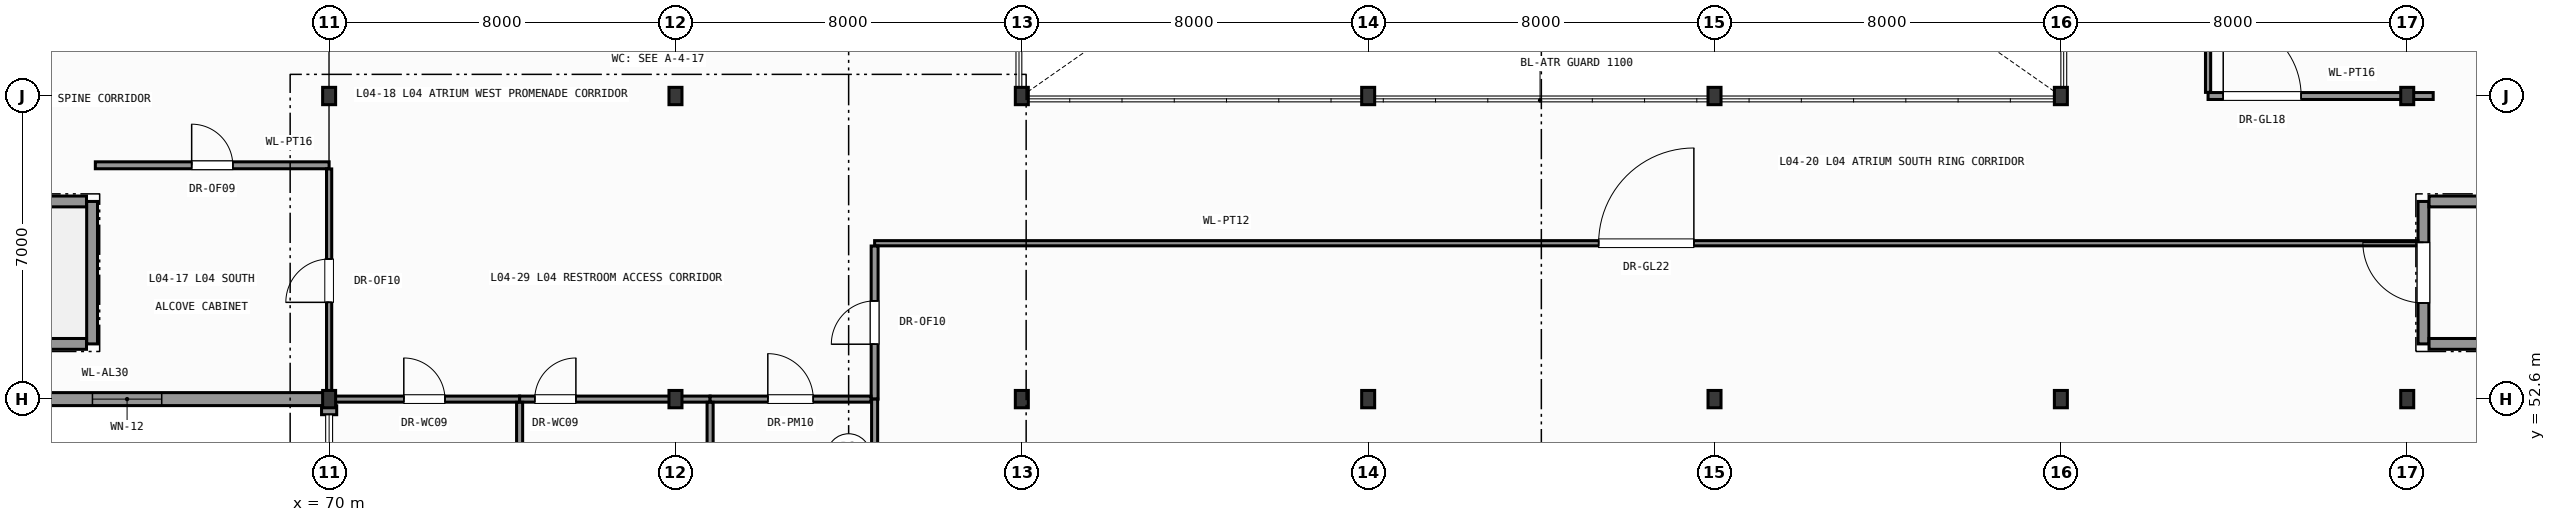
"""IFC4 building model, lengths in metres.
Left out: names, types, materials, properties, quantities, classifications, styles, units other than length and angle.
Written with IfcOpenShell. Run it as: python <this file> out.ifc"""

import sys

from ifc_helpers import new_model, si_unit, direction, frame, frame_2d, origin, origin_2d, place, context, subcontext, project, spatial, rectangle, i_section, extrude, element, fill, save


model = new_model("IFC4")
c1 = context("Model", 3, precision=1e-05, world=origin(), true_north=direction((0.0, 1.0)))
c2 = subcontext(c1, "Body", "Model", "MODEL_VIEW")
j1 = project(units=[si_unit("LENGTHUNIT", "METRE"), si_unit("PLANEANGLEUNIT", "RADIAN")], contexts=[c1])
p1 = place(None, origin())
s1 = spatial("IfcSite", under=j1, at=p1, CompositionType="ELEMENT")
p2 = place(p1, origin())
s2 = spatial("IfcBuilding", under=s1, at=p2, CompositionType="ELEMENT")
p3 = place(p2, frame((0.0, 0.0, 18.0)))
s3 = spatial("IfcBuildingStorey", under=s2, at=p3, CompositionType="ELEMENT", Elevation=18.0)
for number, where, z_axis, x_axis in (
    (1, (70.0, 52.6, 0.0), (0.0, 0.0, 1.0), (1.0, 0.0, 0.0)),
    (2, (70.0, 59.6, 0.0), (0.0, 0.0, 1.0), (1.0, 0.0, 0.0)),
    (3, (78.0, 52.6, 0.0), (0.0, 0.0, 1.0), (1.0, 0.0, 0.0)),
    (4, (78.0, 59.6, 0.0), (0.0, 0.0, 1.0), (1.0, 0.0, 0.0)),
    (5, (86.0, 52.6, 0.0), (0.0, 0.0, 1.0), (1.0, 0.0, 0.0)),
    (6, (86.0, 59.6, 0.0), (0.0, 0.0, 1.0), (1.0, 0.0, 0.0)),
    (7, (94.0, 52.6, 0.0), (0.0, 0.0, 1.0), (1.0, 0.0, 0.0)),
    (8, (94.0, 59.6, 0.0), (0.0, 0.0, 1.0), (1.0, 0.0, 0.0)),
    (9, (102.0, 52.6, 0.0), (0.0, 0.0, 1.0), (1.0, 0.0, 0.0)),
    (10, (102.0, 59.6, 0.0), (0.0, 0.0, 1.0), (1.0, 0.0, 0.0)),
    (11, (110.0, 52.6, 0.0), (0.0, 0.0, 1.0), (1.0, 0.0, 0.0)),
    (12, (110.0, 59.6, 0.0), (0.0, 0.0, 1.0), (1.0, 0.0, 0.0)),
    (13, (118.0, 52.6, 0.0), (0.0, 0.0, 1.0), (1.0, 0.0, 0.0)),
    (14, (118.0, 59.6, 0.0), (0.0, 0.0, 1.0), (1.0, 0.0, 0.0)),
):
    element("IfcColumn", number, at=place(p3, frame(where, z_axis=z_axis, x_axis=x_axis)), inside=s3, PredefinedType="COLUMN", context=c2, shape_type="SweptSolid", body=[
        extrude(i_section(OverallWidth=0.3, OverallDepth=0.4, WebThickness=0.013, FlangeThickness=0.024, FilletRadius=0.027, at=origin_2d()), origin(), (0.0, 0.0, 1.0), 4.2),
    ])
p4 = place(p3, frame((70.0, 52.6, 0.0), z_axis=(0.0, 0.0, 1.0), x_axis=(-1.0, 0.0, 0.0)))
e15 = element("IfcWall", 15, at=p4, inside=s3, PredefinedType="SOLIDWALL", context=c2, shape_type="SweptSolid", body=[
    extrude(rectangle(XDim=14.0, YDim=0.3, at=frame_2d((7.0, 0.0))), origin(), (0.0, 0.0, 1.0), 3.415),
])
p5 = place(p4, frame((3.867, 0.0, 0.95)))
e16 = element("IfcOpeningElement", 16, at=p5, cuts=e15, PredefinedType="OPENING", context=c2, shape_type="SweptSolid", body=[
    extrude(rectangle(XDim=1.6, YDim=2.06, at=frame_2d((0.8, 1.03))), frame((0.0, 0.16, 0.0), z_axis=(0.0, -1.0, 0.0), x_axis=(1.0, 0.0, 0.0)), (0.0, 0.0, 1.0), 0.32),
])
p6 = place(p4, frame((8.533, 0.0, 0.95)))
e17 = element("IfcOpeningElement", 17, at=p6, cuts=e15, PredefinedType="OPENING", context=c2, shape_type="SweptSolid", body=[
    extrude(rectangle(XDim=1.6, YDim=2.06, at=frame_2d((0.8, 1.03))), frame((0.0, 0.16, 0.0), z_axis=(0.0, -1.0, 0.0), x_axis=(1.0, 0.0, 0.0)), (0.0, 0.0, 1.0), 0.32),
])
p7 = place(p3, frame((70.0, 52.446, 0.0), z_axis=(0.0, 0.0, 1.0), x_axis=(0.0, -1.0, 0.0)))
e18 = element("IfcWall", 18, at=p7, inside=s3, PredefinedType="SOLIDWALL", context=c2, shape_type="SweptSolid", body=[
    extrude(rectangle(XDim=0.206, YDim=0.35, at=frame_2d((0.103, 0.0))), origin(), (0.0, 0.0, 1.0), 3.98),
])
p8 = place(p3, frame((64.525, 53.875, 0.0), z_axis=(0.0, 0.0, 1.0), x_axis=(0.0, 1.0, 0.0)))
e19 = element("IfcWall", 19, at=p8, inside=s3, PredefinedType="SHEAR", context=c2, shape_type="SweptSolid", body=[
    extrude(rectangle(XDim=3.29, YDim=0.25, at=frame_2d((1.645, 0.0))), origin(), (0.0, 0.0, 1.0), 3.98),
])
for number, where, z_axis, x_axis in (
    (20, (57.204, 53.875, 0.0), (0.0, 0.0, 1.0), (1.0, 0.0, 0.0)),
    (21, (57.204, 57.165, 0.0), (0.0, 0.0, 1.0), (1.0, 0.0, 0.0)),
):
    element("IfcWall", number, at=place(p3, frame(where, z_axis=z_axis, x_axis=x_axis)), inside=s3, PredefinedType="SHEAR", context=c2, shape_type="SweptSolid", body=[
        extrude(rectangle(XDim=7.192, YDim=0.25, at=frame_2d((3.596, 0.0))), origin(), (0.0, 0.0, 1.0), 3.98),
    ])
p9 = place(p3, frame((118.375, 53.875, 0.0), z_axis=(0.0, 0.0, 1.0), x_axis=(0.0, 1.0, 0.0)))
e22 = element("IfcWall", 22, at=p9, inside=s3, PredefinedType="SHEAR", context=c2, shape_type="SweptSolid", body=[
    extrude(rectangle(XDim=3.29, YDim=0.25, at=frame_2d((1.645, 0.0))), origin(), (0.0, 0.0, 1.0), 3.98),
])
p10 = place(p9, frame((0.945, 0.0, 0.0)))
e23 = element("IfcOpeningElement", 23, at=p10, cuts=e22, PredefinedType="OPENING", context=c2, shape_type="SweptSolid", body=[
    extrude(rectangle(XDim=1.4, YDim=2.2, at=frame_2d((0.7, 1.1))), frame((0.0, 0.135, 0.0), z_axis=(0.0, -1.0, 0.0), x_axis=(1.0, 0.0, 0.0)), (0.0, 0.0, 1.0), 0.27),
])
for number, where, z_axis, x_axis in (
    (24, (118.504, 53.875, 0.0), (0.0, 0.0, 1.0), (1.0, 0.0, 0.0)),
    (25, (118.504, 57.165, 0.0), (0.0, 0.0, 1.0), (1.0, 0.0, 0.0)),
):
    element("IfcWall", number, at=place(p3, frame(where, z_axis=z_axis, x_axis=x_axis)), inside=s3, PredefinedType="SHEAR", context=c2, shape_type="SweptSolid", body=[
        extrude(rectangle(XDim=6.892, YDim=0.25, at=frame_2d((3.446, 0.0))), origin(), (0.0, 0.0, 1.0), 3.98),
    ])
p11 = place(p3, frame((64.6, 58.0, 0.0), z_axis=(0.0, 0.0, 1.0), x_axis=(1.0, 0.0, 0.0)))
e26 = element("IfcWall", 26, at=p11, inside=s3, PredefinedType="PARTITIONING", context=c2, shape_type="SweptSolid", body=[
    extrude(rectangle(XDim=5.4, YDim=0.16, at=frame_2d((2.7, 0.0))), origin(), (0.0, 0.0, 1.0), 3.98),
])
p12 = place(p11, frame((2.225, 0.0, 0.0)))
e27 = element("IfcOpeningElement", 27, at=p12, cuts=e26, PredefinedType="OPENING", context=c2, shape_type="SweptSolid", body=[
    extrude(rectangle(XDim=0.95, YDim=2.1, at=frame_2d((0.475, 1.05))), frame((0.0, 0.09, 0.0), z_axis=(0.0, -1.0, 0.0), x_axis=(1.0, 0.0, 0.0)), (0.0, 0.0, 1.0), 0.18),
])
p13 = place(p3, frame((70.0, 52.754, 0.0), z_axis=(0.0, 0.0, 1.0), x_axis=(0.0, 1.0, 0.0)))
e28 = element("IfcWall", 28, at=p13, inside=s3, PredefinedType="PARTITIONING", context=c2, shape_type="SweptSolid", body=[
    extrude(rectangle(XDim=5.162, YDim=0.12, at=frame_2d((2.581, 0.0))), origin(), (0.0, 0.0, 1.0), 3.525),
])
p14 = place(p13, frame((2.081, 0.0, 0.0)))
e29 = element("IfcOpeningElement", 29, at=p14, cuts=e28, PredefinedType="OPENING", context=c2, shape_type="SweptSolid", body=[
    extrude(rectangle(XDim=1.0, YDim=2.15, at=frame_2d((0.5, 1.075))), frame((0.0, 0.07, 0.0), z_axis=(0.0, -1.0, 0.0), x_axis=(1.0, 0.0, 0.0)), (0.0, 0.0, 1.0), 0.14),
])
p15 = place(p3, frame((82.6, 56.2, 0.0), z_axis=(0.0, 0.0, 1.0), x_axis=(1.0, 0.0, 0.0)))
e30 = element("IfcWall", 30, at=p15, inside=s3, PredefinedType="PARTITIONING", context=c2, shape_type="SweptSolid", body=[
    extrude(rectangle(XDim=35.646, YDim=0.12, at=frame_2d((17.823, 0.0))), origin(), (0.0, 0.0, 1.0), 3.605),
])
p16 = place(p15, frame((16.723, 0.0, 0.0)))
e31 = element("IfcOpeningElement", 31, at=p16, cuts=e30, PredefinedType="OPENING", context=c2, shape_type="SweptSolid", body=[
    extrude(rectangle(XDim=2.2, YDim=2.6, at=frame_2d((1.1, 1.3))), frame((0.0, 0.07, 0.0), z_axis=(0.0, -1.0, 0.0), x_axis=(1.0, 0.0, 0.0)), (0.0, 0.0, 1.0), 0.14),
])
p17 = place(p3, frame((113.4, 59.6, 0.0), z_axis=(0.0, 0.0, 1.0), x_axis=(1.0, 0.0, 0.0)))
e32 = element("IfcWall", 32, at=p17, inside=s3, PredefinedType="PARTITIONING", context=c2, shape_type="SweptSolid", body=[
    extrude(rectangle(XDim=5.2, YDim=0.16, at=frame_2d((2.6, 0.0))), origin(), (0.0, 0.0, 1.0), 3.575),
])
p18 = place(p17, frame((0.35, 0.0, 0.0)))
e33 = element("IfcOpeningElement", 33, at=p18, cuts=e32, PredefinedType="OPENING", context=c2, shape_type="SweptSolid", body=[
    extrude(rectangle(XDim=1.8, YDim=2.4, at=frame_2d((0.9, 1.2))), frame((0.0, 0.09, 0.0), z_axis=(0.0, -1.0, 0.0), x_axis=(1.0, 0.0, 0.0)), (0.0, 0.0, 1.0), 0.18),
])
p19 = place(p3, frame((113.4, 59.684, 0.0), z_axis=(0.0, 0.0, 1.0), x_axis=(0.0, 1.0, 0.0)))
e34 = element("IfcWall", 34, at=p19, inside=s3, PredefinedType="PARTITIONING", context=c2, shape_type="SweptSolid", body=[
    extrude(rectangle(XDim=8.316, YDim=0.12, at=frame_2d((4.158, 0.0))), origin(), (0.0, 0.0, 1.0), 3.98),
])
p20 = place(p19, frame((3.058, 0.0, 0.0)))
e35 = element("IfcOpeningElement", 35, at=p20, cuts=e34, PredefinedType="OPENING", context=c2, shape_type="SweptSolid", body=[
    extrude(rectangle(XDim=2.2, YDim=2.6, at=frame_2d((1.1, 1.3))), frame((0.0, 0.07, 0.0), z_axis=(0.0, -1.0, 0.0), x_axis=(1.0, 0.0, 0.0)), (0.0, 0.0, 1.0), 0.14),
])
p21 = place(p3, frame((82.6, 52.6, 0.0), z_axis=(0.0, 0.0, 1.0), x_axis=(0.0, 1.0, 0.0)))
e36 = element("IfcWall", 36, at=p21, inside=s3, PredefinedType="PARTITIONING", context=c2, shape_type="SweptSolid", body=[
    extrude(rectangle(XDim=3.536, YDim=0.16, at=frame_2d((1.768, 0.0))), origin(), (0.0, 0.0, 1.0), 3.98),
])
p22 = place(p21, frame((1.268, 0.0, 0.0)))
e37 = element("IfcOpeningElement", 37, at=p22, cuts=e36, PredefinedType="OPENING", context=c2, shape_type="SweptSolid", body=[
    extrude(rectangle(XDim=1.0, YDim=2.15, at=frame_2d((0.5, 1.075))), frame((0.0, 0.09, 0.0), z_axis=(0.0, -1.0, 0.0), x_axis=(1.0, 0.0, 0.0)), (0.0, 0.0, 1.0), 0.18),
])
p23 = place(p3, frame((82.6, 45.6, 0.0), z_axis=(0.0, 0.0, 1.0), x_axis=(0.0, 1.0, 0.0)))
e38 = element("IfcWall", 38, at=p23, inside=s3, PredefinedType="PARTITIONING", context=c2, shape_type="SweptSolid", body=[
    extrude(rectangle(XDim=7.0, YDim=0.14, at=frame_2d((3.5, 0.0))), origin(), (0.0, 0.0, 1.0), 3.98),
])
p24 = place(p23, frame((2.975, 0.0, 0.0)))
e39 = element("IfcOpeningElement", 39, at=p24, cuts=e38, PredefinedType="OPENING", context=c2, shape_type="SweptSolid", body=[
    extrude(rectangle(XDim=1.05, YDim=2.15, at=frame_2d((0.525, 1.075))), frame((0.0, 0.08, 0.0), z_axis=(0.0, -1.0, 0.0), x_axis=(1.0, 0.0, 0.0)), (0.0, 0.0, 1.0), 0.16),
])
p25 = place(p3, frame((70.0, 52.6, 0.0), z_axis=(0.0, 0.0, 1.0), x_axis=(1.0, 0.0, 0.0)))
e40 = element("IfcWall", 40, at=p25, inside=s3, PredefinedType="PARTITIONING", context=c2, shape_type="SweptSolid", body=[
    extrude(rectangle(XDim=4.4, YDim=0.14, at=frame_2d((2.2, 0.0))), origin(), (0.0, 0.0, 1.0), 3.645),
])
p26 = place(p25, frame((1.725, 0.0, 0.0)))
e41 = element("IfcOpeningElement", 41, at=p26, cuts=e40, PredefinedType="OPENING", context=c2, shape_type="SweptSolid", body=[
    extrude(rectangle(XDim=0.95, YDim=2.1, at=frame_2d((0.475, 1.05))), frame((0.0, 0.08, 0.0), z_axis=(0.0, -1.0, 0.0), x_axis=(1.0, 0.0, 0.0)), (0.0, 0.0, 1.0), 0.16),
])
p27 = place(p3, frame((74.4, 52.6, 0.0), z_axis=(0.0, 0.0, 1.0), x_axis=(1.0, 0.0, 0.0)))
e42 = element("IfcWall", 42, at=p27, inside=s3, PredefinedType="PARTITIONING", context=c2, shape_type="SweptSolid", body=[
    extrude(rectangle(XDim=4.4, YDim=0.14, at=frame_2d((2.2, 0.0))), origin(), (0.0, 0.0, 1.0), 3.565),
])
p28 = place(p27, frame((0.35, 0.0, 0.0)))
e43 = element("IfcOpeningElement", 43, at=p28, cuts=e42, PredefinedType="OPENING", context=c2, shape_type="SweptSolid", body=[
    extrude(rectangle(XDim=0.95, YDim=2.1, at=frame_2d((0.475, 1.05))), frame((0.0, 0.08, 0.0), z_axis=(0.0, -1.0, 0.0), x_axis=(1.0, 0.0, 0.0)), (0.0, 0.0, 1.0), 0.16),
])
p29 = place(p3, frame((78.8, 52.6, 0.0), z_axis=(0.0, 0.0, 1.0), x_axis=(1.0, 0.0, 0.0)))
e44 = element("IfcWall", 44, at=p29, inside=s3, PredefinedType="PARTITIONING", context=c2, shape_type="SweptSolid", body=[
    extrude(rectangle(XDim=3.716, YDim=0.14, at=frame_2d((1.858, 0.0))), origin(), (0.0, 0.0, 1.0), 3.565),
])
p30 = place(p29, frame((1.333, 0.0, 0.0)))
e45 = element("IfcOpeningElement", 45, at=p30, cuts=e44, PredefinedType="OPENING", context=c2, shape_type="SweptSolid", body=[
    extrude(rectangle(XDim=1.05, YDim=2.15, at=frame_2d((0.525, 1.075))), frame((0.0, 0.08, 0.0), z_axis=(0.0, -1.0, 0.0), x_axis=(1.0, 0.0, 0.0)), (0.0, 0.0, 1.0), 0.16),
])
for number, where, z_axis, x_axis in (
    (46, (74.4, 45.6, 0.0), (0.0, 0.0, 1.0), (0.0, 1.0, 0.0)),
    (47, (78.8, 45.6, 0.0), (0.0, 0.0, 1.0), (0.0, 1.0, 0.0)),
):
    element("IfcWall", number, at=place(p3, frame(where, z_axis=z_axis, x_axis=x_axis)), inside=s3, PredefinedType="PARTITIONING", context=c2, shape_type="SweptSolid", body=[
        extrude(rectangle(XDim=6.926, YDim=0.14, at=frame_2d((3.463, 0.0))), origin(), (0.0, 0.0, 1.0), 3.98),
    ])
p31 = place(p5, origin())
e48 = element("IfcWindow", 48, at=p31, inside=s3, PartitioningType="SINGLE_PANEL", PredefinedType="WINDOW", context=c2, shape_type="SweptSolid", body=[
    extrude(rectangle(XDim=1.6, YDim=2.06, at=frame_2d((0.8, 1.03))), frame((0.0, 0.03, 0.0), z_axis=(0.0, -1.0, 0.0), x_axis=(1.0, 0.0, 0.0)), (0.0, 0.0, 1.0), 0.06),
])
fill(e16, e48)
p32 = place(p10, origin())
e49 = element("IfcDoor", 49, at=p32, inside=s3, OperationType="SINGLE_SWING_RIGHT", PredefinedType="DOOR", context=c2, shape_type="SweptSolid", body=[
    extrude(rectangle(XDim=1.4, YDim=2.2, at=frame_2d((0.7, 1.1))), frame((0.0, 0.025, 0.0), z_axis=(0.0, -1.0, 0.0), x_axis=(1.0, 0.0, 0.0)), (0.0, 0.0, 1.0), 0.05),
])
fill(e23, e49)
p33 = place(p12, origin())
e50 = element("IfcDoor", 50, at=p33, inside=s3, OperationType="SINGLE_SWING_LEFT", PredefinedType="DOOR", context=c2, shape_type="SweptSolid", body=[
    extrude(rectangle(XDim=0.95, YDim=2.1, at=frame_2d((0.475, 1.05))), frame((0.0, 0.025, 0.0), z_axis=(0.0, -1.0, 0.0), x_axis=(1.0, 0.0, 0.0)), (0.0, 0.0, 1.0), 0.05),
])
fill(e27, e50)
p34 = place(p14, origin())
e51 = element("IfcDoor", 51, at=p34, inside=s3, OperationType="SINGLE_SWING_LEFT", PredefinedType="DOOR", context=c2, shape_type="SweptSolid", body=[
    extrude(rectangle(XDim=1.0, YDim=2.15, at=frame_2d((0.5, 1.075))), frame((0.0, 0.025, 0.0), z_axis=(0.0, -1.0, 0.0), x_axis=(1.0, 0.0, 0.0)), (0.0, 0.0, 1.0), 0.05),
])
fill(e29, e51)
p35 = place(p16, origin())
e52 = element("IfcDoor", 52, at=p35, inside=s3, OperationType="SINGLE_SWING_RIGHT", PredefinedType="DOOR", context=c2, shape_type="SweptSolid", body=[
    extrude(rectangle(XDim=2.2, YDim=2.6, at=frame_2d((1.1, 1.3))), frame((0.0, 0.025, 0.0), z_axis=(0.0, -1.0, 0.0), x_axis=(1.0, 0.0, 0.0)), (0.0, 0.0, 1.0), 0.05),
])
fill(e31, e52)
p36 = place(p18, origin())
e53 = element("IfcDoor", 53, at=p36, inside=s3, OperationType="SINGLE_SWING_LEFT", PredefinedType="DOOR", context=c2, shape_type="SweptSolid", body=[
    extrude(rectangle(XDim=1.8, YDim=2.4, at=frame_2d((0.9, 1.2))), frame((0.0, 0.025, 0.0), z_axis=(0.0, -1.0, 0.0), x_axis=(1.0, 0.0, 0.0)), (0.0, 0.0, 1.0), 0.05),
])
fill(e33, e53)
p37 = place(p22, origin())
e54 = element("IfcDoor", 54, at=p37, inside=s3, OperationType="SINGLE_SWING_LEFT", PredefinedType="DOOR", context=c2, shape_type="SweptSolid", body=[
    extrude(rectangle(XDim=1.0, YDim=2.15, at=frame_2d((0.5, 1.075))), frame((0.0, 0.025, 0.0), z_axis=(0.0, -1.0, 0.0), x_axis=(1.0, 0.0, 0.0)), (0.0, 0.0, 1.0), 0.05),
])
fill(e37, e54)
p38 = place(p26, origin())
e55 = element("IfcDoor", 55, at=p38, inside=s3, OperationType="SINGLE_SWING_LEFT", PredefinedType="DOOR", context=c2, shape_type="SweptSolid", body=[
    extrude(rectangle(XDim=0.95, YDim=2.1, at=frame_2d((0.475, 1.05))), frame((0.0, 0.025, 0.0), z_axis=(0.0, -1.0, 0.0), x_axis=(1.0, 0.0, 0.0)), (0.0, 0.0, 1.0), 0.05),
])
fill(e41, e55)
p39 = place(p28, origin())
e56 = element("IfcDoor", 56, at=p39, inside=s3, OperationType="SINGLE_SWING_RIGHT", PredefinedType="DOOR", context=c2, shape_type="SweptSolid", body=[
    extrude(rectangle(XDim=0.95, YDim=2.1, at=frame_2d((0.475, 1.05))), frame((0.0, 0.025, 0.0), z_axis=(0.0, -1.0, 0.0), x_axis=(1.0, 0.0, 0.0)), (0.0, 0.0, 1.0), 0.05),
])
fill(e43, e56)
p40 = place(p30, origin())
e57 = element("IfcDoor", 57, at=p40, inside=s3, OperationType="SINGLE_SWING_LEFT", PredefinedType="DOOR", context=c2, shape_type="SweptSolid", body=[
    extrude(rectangle(XDim=1.05, YDim=2.15, at=frame_2d((0.525, 1.075))), frame((0.0, 0.025, 0.0), z_axis=(0.0, -1.0, 0.0), x_axis=(1.0, 0.0, 0.0)), (0.0, 0.0, 1.0), 0.05),
])
fill(e45, e57)
save(model, sys.argv[1])
